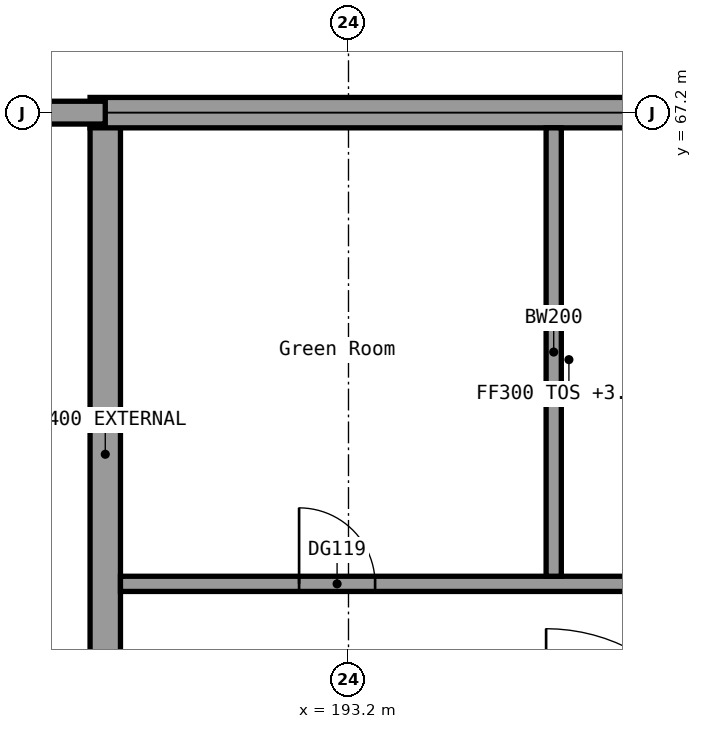
"""IFC4 building model, lengths in metres.
Left out: names, types, materials, properties, quantities, classifications, styles, units other than length and angle.
Written with IfcOpenShell. Run it as: python <this file> out.ifc"""

import sys

from ifc_helpers import new_model, si_unit, direction, frame, frame_2d, origin, place, context, subcontext, project, spatial, rectangle, extrude, element, fill, save


model = new_model("IFC4")
c1 = context("Model", 3, precision=1e-05, world=origin(), true_north=direction((0.0, 1.0)))
c2 = subcontext(c1, "Body", "Model", "MODEL_VIEW")
j1 = project(units=[si_unit("LENGTHUNIT", "METRE"), si_unit("PLANEANGLEUNIT", "RADIAN")], contexts=[c1])
p1 = place(None, origin())
s1 = spatial("IfcSite", under=j1, at=p1, CompositionType="ELEMENT")
p2 = place(p1, origin())
s2 = spatial("IfcBuilding", under=s1, at=p2, CompositionType="ELEMENT")
p3 = place(p2, origin())
s3 = spatial("IfcBuildingStorey", under=s2, at=p3, CompositionType="ELEMENT", Elevation=0.0)
p4 = place(p3, frame((190.0, 67.2, 0.0), z_axis=(0.0, 0.0, 1.0), x_axis=(0.0, -1.0, 0.0)))
e1 = element("IfcWall", 1, at=p4, inside=s3, PredefinedType="SHEAR", context=c2, shape_type="SweptSolid", body=[
    extrude(rectangle(XDim=8.99, YDim=0.4, at=frame_2d((4.495, 0.0))), origin(), (0.0, 0.0, 1.0), 6.0),
])
p5 = place(p3, frame((213.4, 67.2, 0.0), z_axis=(0.0, 0.0, 1.0), x_axis=(-1.0, 0.0, 0.0)))
e2 = element("IfcWall", 2, at=p5, inside=s3, PredefinedType="SHEAR", context=c2, shape_type="SweptSolid", body=[
    extrude(rectangle(XDim=23.6, YDim=0.4, at=frame_2d((11.8, 0.0))), origin(), (0.0, 0.0, 1.0), 6.0),
])
p6 = place(p5, frame((6.2, 0.0, 0.0)))
e3 = element("IfcOpeningElement", 3, at=p6, cuts=e2, PredefinedType="OPENING", context=c2, shape_type="SweptSolid", body=[
    extrude(rectangle(XDim=2.4, YDim=2.4, at=frame_2d((1.2, 1.2))), frame((0.0, 0.2, 0.0), z_axis=(0.0, -1.0, 0.0), x_axis=(1.0, 0.0, 0.0)), (0.0, 0.0, 1.0), 0.4),
])
p7 = place(p3, frame((190.2, 61.0, 0.0), z_axis=(0.0, 0.0, 1.0), x_axis=(1.0, 0.0, 0.0)))
e4 = element("IfcWall", 4, at=p7, inside=s3, PredefinedType="SOLIDWALL", context=c2, shape_type="SweptSolid", body=[
    extrude(rectangle(XDim=22.8, YDim=0.2, at=frame_2d((11.4, 0.0))), origin(), (0.0, 0.0, 1.0), 3.6),
])
p8 = place(p7, frame((2.35, 0.0, 0.0)))
e5 = element("IfcOpeningElement", 5, at=p8, cuts=e4, PredefinedType="OPENING", context=c2, shape_type="SweptSolid", body=[
    extrude(rectangle(XDim=1.0, YDim=2.1, at=frame_2d((0.5, 1.05))), frame((0.0, 0.1, 0.0), z_axis=(0.0, -1.0, 0.0), x_axis=(1.0, 0.0, 0.0)), (0.0, 0.0, 1.0), 0.2),
])
p9 = place(p7, frame((8.05, 0.0, 0.0)))
e6 = element("IfcOpeningElement", 6, at=p9, cuts=e4, PredefinedType="OPENING", context=c2, shape_type="SweptSolid", body=[
    extrude(rectangle(XDim=1.0, YDim=2.1, at=frame_2d((0.5, 1.05))), frame((0.0, 0.1, 0.0), z_axis=(0.0, -1.0, 0.0), x_axis=(1.0, 0.0, 0.0)), (0.0, 0.0, 1.0), 0.2),
])
p10 = place(p7, frame((13.75, 0.0, 0.0)))
e7 = element("IfcOpeningElement", 7, at=p10, cuts=e4, PredefinedType="OPENING", context=c2, shape_type="SweptSolid", body=[
    extrude(rectangle(XDim=1.0, YDim=2.1, at=frame_2d((0.5, 1.05))), frame((0.0, 0.1, 0.0), z_axis=(0.0, -1.0, 0.0), x_axis=(1.0, 0.0, 0.0)), (0.0, 0.0, 1.0), 0.2),
])
p11 = place(p7, frame((19.45, 0.0, 0.0)))
e8 = element("IfcOpeningElement", 8, at=p11, cuts=e4, PredefinedType="OPENING", context=c2, shape_type="SweptSolid", body=[
    extrude(rectangle(XDim=1.0, YDim=2.1, at=frame_2d((0.5, 1.05))), frame((0.0, 0.1, 0.0), z_axis=(0.0, -1.0, 0.0), x_axis=(1.0, 0.0, 0.0)), (0.0, 0.0, 1.0), 0.2),
])
p12 = place(p3, frame((195.9, 61.1, 0.0), z_axis=(0.0, 0.0, 1.0), x_axis=(0.0, 1.0, 0.0)))
e9 = element("IfcWall", 9, at=p12, inside=s3, PredefinedType="SOLIDWALL", context=c2, shape_type="SweptSolid", body=[
    extrude(rectangle(XDim=5.9, YDim=0.2, at=frame_2d((2.95, 0.0))), origin(), (0.0, 0.0, 1.0), 3.6),
])
p13 = place(p3, frame((185.15, 67.2, 0.0), z_axis=(0.0, 0.0, 1.0), x_axis=(1.0, 0.0, 0.0)))
e10 = element("IfcWall", 10, at=p13, inside=s3, PredefinedType="STANDARD", context=c2, shape_type="SweptSolid", body=[
    extrude(rectangle(XDim=4.85, YDim=0.3, at=frame_2d((2.425, 0.0))), origin(), (0.0, 0.0, 1.0), 6.0),
])
p14 = place(p8, origin())
e11 = element("IfcDoor", 11, at=p14, inside=s3, OperationType="SINGLE_SWING_LEFT", PredefinedType="DOOR", context=c2, shape_type="SweptSolid", body=[
    extrude(rectangle(XDim=1.0, YDim=2.1, at=frame_2d((0.5, 1.05))), frame((0.0, 0.025, 0.0), z_axis=(0.0, -1.0, 0.0), x_axis=(1.0, 0.0, 0.0)), (0.0, 0.0, 1.0), 0.05),
])
fill(e5, e11)
save(model, sys.argv[1])
